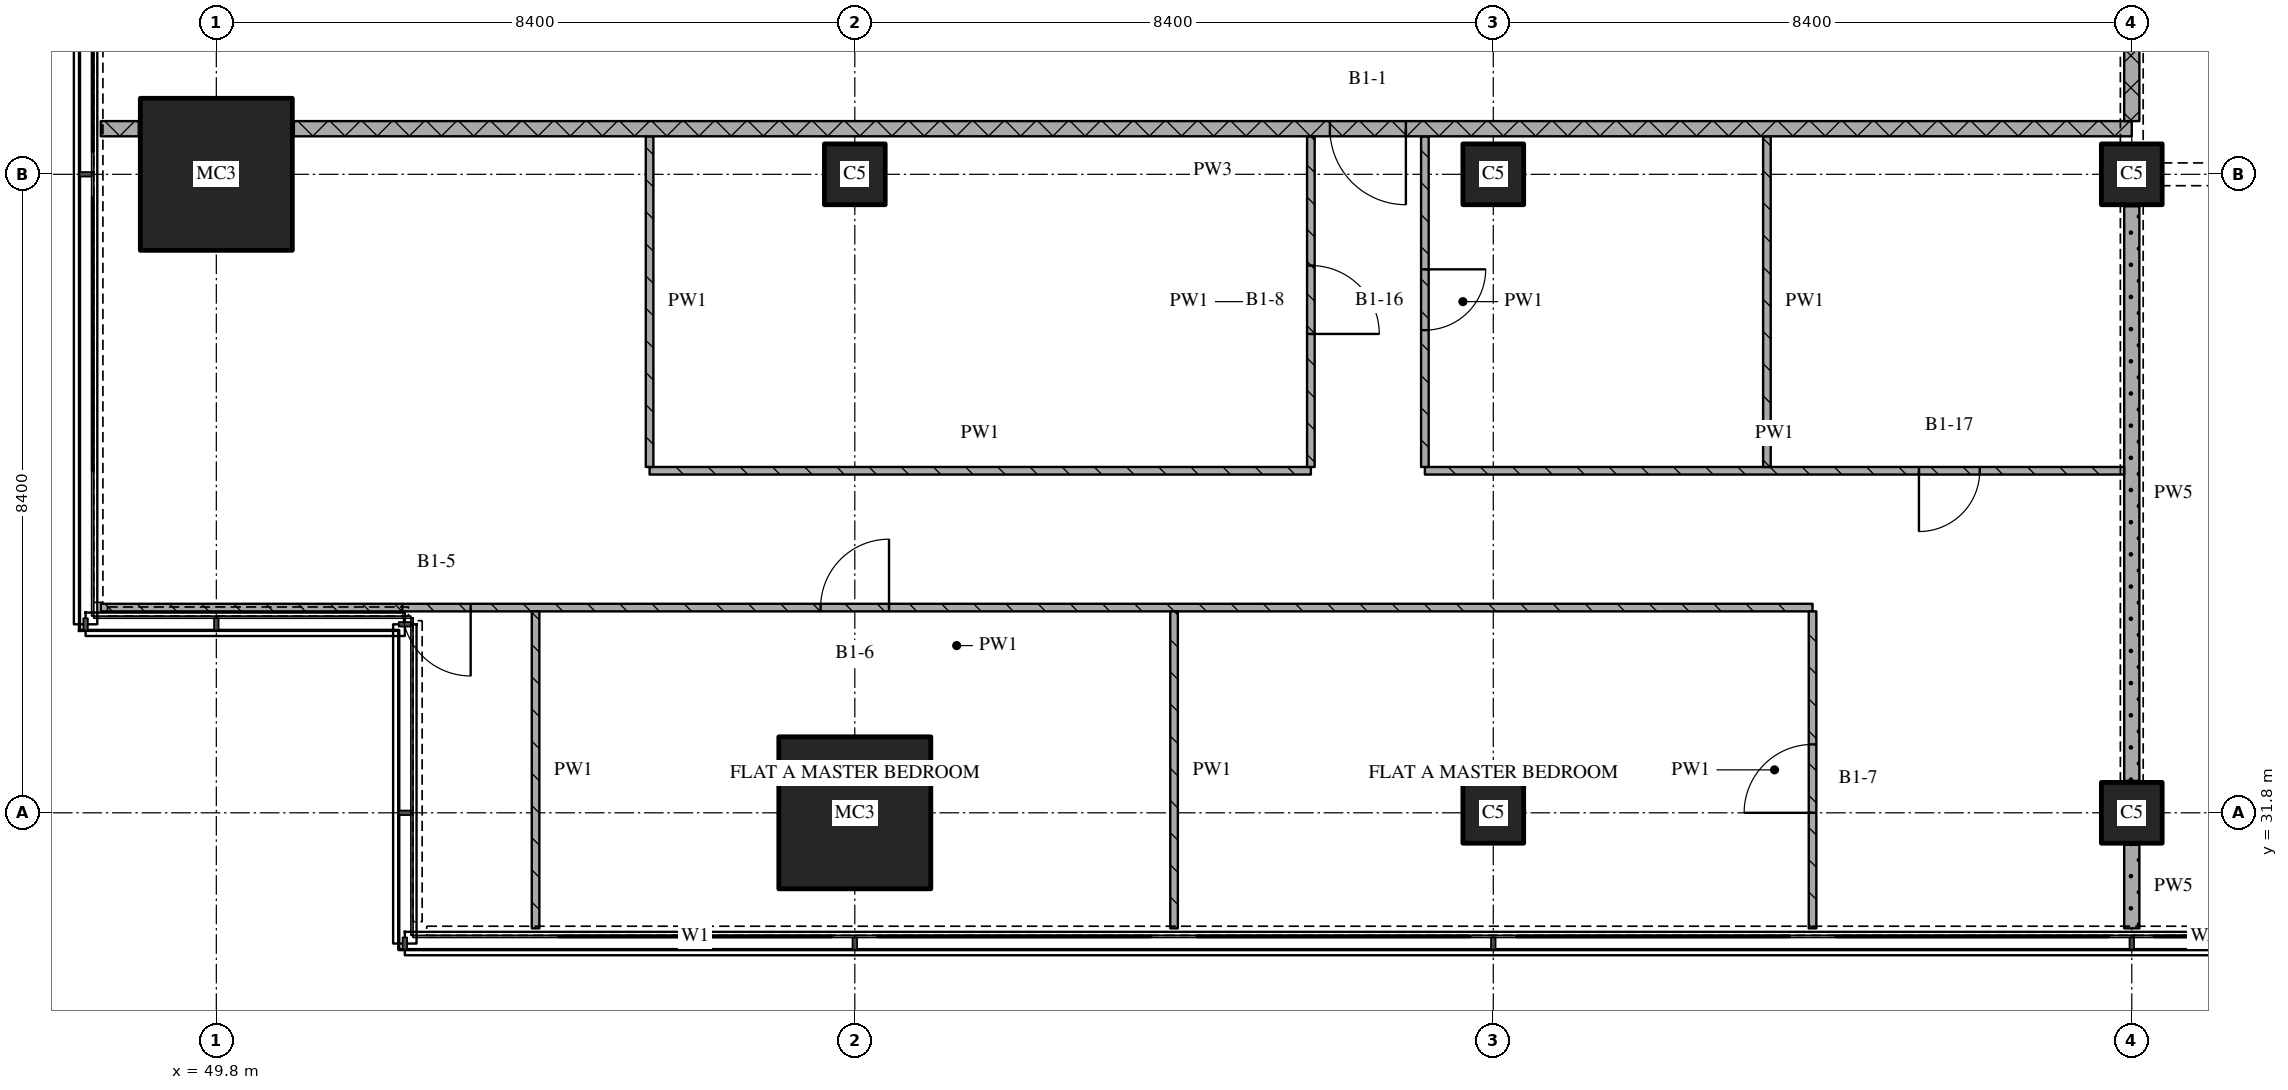
"""IFC4 building model, lengths in metres.
Left out: names, types, materials, properties, quantities, classifications, styles, units other than length and angle.
Written with IfcOpenShell. Run it as: python <this file> out.ifc"""

import sys

from ifc_helpers import new_model, si_unit, direction, frame, frame_2d, origin, origin_2d, place, context, subcontext, project, spatial, rectangle, extrude, element, fill, save


model = new_model("IFC4")
c1 = context("Model", 3, precision=1e-05, world=origin(), true_north=direction((0.0, 1.0)))
c2 = subcontext(c1, "Body", "Model", "MODEL_VIEW")
j1 = project(units=[si_unit("LENGTHUNIT", "METRE"), si_unit("PLANEANGLEUNIT", "RADIAN")], contexts=[c1])
p1 = place(None, origin())
s1 = spatial("IfcSite", under=j1, at=p1, CompositionType="ELEMENT")
p2 = place(p1, origin())
s2 = spatial("IfcBuilding", under=s1, at=p2, CompositionType="ELEMENT")
p3 = place(p2, frame((0.0, 0.0, 95.25)))
s3 = spatial("IfcBuildingStorey", under=s2, at=p3, CompositionType="ELEMENT", Elevation=95.25)
for number, where, z_axis, x_axis in (
    (1, (49.8, 40.2, 0.0), (0.0, 0.0, 1.0), (1.0, 0.0, 0.0)),
    (2, (58.2, 31.8, 0.0), (0.0, 0.0, 1.0), (1.0, 0.0, 0.0)),
):
    element("IfcColumn", number, at=place(p3, frame(where, z_axis=z_axis, x_axis=x_axis)), inside=s3, PredefinedType="COLUMN", context=c2, shape_type="SweptSolid", body=[
        extrude(rectangle(XDim=2.0, YDim=2.0, at=origin_2d()), origin(), (0.0, 0.0, 1.0), 3.6),
    ])
for number, where, z_axis, x_axis in (
    (3, (58.2, 40.2, 0.0), (0.0, 0.0, 1.0), (1.0, 0.0, 0.0)),
    (4, (66.6, 31.8, 0.0), (0.0, 0.0, 1.0), (1.0, 0.0, 0.0)),
    (5, (66.6, 40.2, 0.0), (0.0, 0.0, 1.0), (1.0, 0.0, 0.0)),
    (6, (75.0, 31.8, 0.0), (0.0, 0.0, 1.0), (1.0, 0.0, 0.0)),
    (7, (75.0, 40.2, 0.0), (0.0, 0.0, 1.0), (1.0, 0.0, 0.0)),
):
    element("IfcColumn", number, at=place(p3, frame(where, z_axis=z_axis, x_axis=x_axis)), inside=s3, PredefinedType="COLUMN", context=c2, shape_type="SweptSolid", body=[
        extrude(rectangle(XDim=0.8, YDim=0.8, at=origin_2d()), origin(), (0.0, 0.0, 1.0), 3.6),
    ])
p4 = place(p3, frame((70.8, 34.5, 0.0), z_axis=(0.0, 0.0, 1.0), x_axis=(-1.0, 0.0, 0.0)))
e8 = element("IfcWall", 8, at=p4, inside=s3, PredefinedType="PARTITIONING", context=c2, shape_type="SweptSolid", body=[
    extrude(rectangle(XDim=22.52, YDim=0.1, at=frame_2d((11.26, 0.0))), origin(), (0.0, 0.0, 1.0), 3.32),
])
p5 = place(p4, frame((12.15, 0.0, 0.0)))
e9 = element("IfcOpeningElement", 9, at=p5, cuts=e8, PredefinedType="OPENING", context=c2, shape_type="SweptSolid", body=[
    extrude(rectangle(XDim=0.9, YDim=2.1, at=frame_2d((0.45, 1.05))), frame((0.0, 0.06, 0.0), z_axis=(0.0, -1.0, 0.0), x_axis=(1.0, 0.0, 0.0)), (0.0, 0.0, 1.0), 0.12),
])
p6 = place(p4, frame((17.654, 0.0, 0.0)))
e10 = element("IfcOpeningElement", 10, at=p6, cuts=e8, PredefinedType="OPENING", context=c2, shape_type="SweptSolid", body=[
    extrude(rectangle(XDim=0.9, YDim=2.1, at=frame_2d((0.45, 1.05))), frame((0.0, 0.06, 0.0), z_axis=(0.0, -1.0, 0.0), x_axis=(1.0, 0.0, 0.0)), (0.0, 0.0, 1.0), 0.12),
])
p7 = place(p3, frame((55.5, 36.3, 0.0), z_axis=(0.0, 0.0, 1.0), x_axis=(1.0, 0.0, 0.0)))
e11 = element("IfcWall", 11, at=p7, inside=s3, PredefinedType="PARTITIONING", context=c2, shape_type="SweptSolid", body=[
    extrude(rectangle(XDim=8.7, YDim=0.1, at=frame_2d((4.35, 0.0))), origin(), (0.0, 0.0, 1.0), 3.32),
])
p8 = place(p3, frame((65.7, 36.3, 0.0), z_axis=(0.0, 0.0, 1.0), x_axis=(1.0, 0.0, 0.0)))
e12 = element("IfcWall", 12, at=p8, inside=s3, PredefinedType="PARTITIONING", context=c2, shape_type="SweptSolid", body=[
    extrude(rectangle(XDim=9.2, YDim=0.1, at=frame_2d((4.6, 0.0))), origin(), (0.0, 0.0, 1.0), 3.32),
])
p9 = place(p8, frame((6.5, 0.0, 0.0)))
e13 = element("IfcOpeningElement", 13, at=p9, cuts=e12, PredefinedType="OPENING", context=c2, shape_type="SweptSolid", body=[
    extrude(rectangle(XDim=0.8, YDim=2.1, at=frame_2d((0.4, 1.05))), frame((0.0, 0.06, 0.0), z_axis=(0.0, -1.0, 0.0), x_axis=(1.0, 0.0, 0.0)), (0.0, 0.0, 1.0), 0.12),
])
p10 = place(p3, frame((48.28, 40.8, 0.0), z_axis=(0.0, 0.0, 1.0), x_axis=(1.0, 0.0, 0.0)))
e14 = element("IfcWall", 14, at=p10, inside=s3, PredefinedType="PARTITIONING", context=c2, shape_type="SweptSolid", body=[
    extrude(rectangle(XDim=0.5, YDim=0.2, at=frame_2d((0.25, 0.0))), origin(), (0.0, 0.0, 1.0), 3.32),
])
p11 = place(p3, frame((75.0, 40.8, 0.0), z_axis=(0.0, 0.0, 1.0), x_axis=(-1.0, 0.0, 0.0)))
e15 = element("IfcWall", 15, at=p11, inside=s3, PredefinedType="PARTITIONING", context=c2, shape_type="SweptSolid", body=[
    extrude(rectangle(XDim=24.18, YDim=0.2, at=frame_2d((12.09, 0.0))), origin(), (0.0, 0.0, 1.0), 3.32),
])
p12 = place(p11, frame((9.55, 0.0, 0.0)))
e16 = element("IfcOpeningElement", 16, at=p12, cuts=e15, PredefinedType="OPENING", context=c2, shape_type="SweptSolid", body=[
    extrude(rectangle(XDim=1.0, YDim=2.1, at=frame_2d((0.5, 1.05))), frame((0.0, 0.11, 0.0), z_axis=(0.0, -1.0, 0.0), x_axis=(1.0, 0.0, 0.0)), (0.0, 0.0, 1.0), 0.22),
])
p13 = place(p3, frame((54.0, 34.45, 0.0), z_axis=(0.0, 0.0, 1.0), x_axis=(0.0, -1.0, 0.0)))
e17 = element("IfcWall", 17, at=p13, inside=s3, PredefinedType="PARTITIONING", context=c2, shape_type="SweptSolid", body=[
    extrude(rectangle(XDim=4.17, YDim=0.1, at=frame_2d((2.085, 0.0))), origin(), (0.0, 0.0, 1.0), 3.32),
])
p14 = place(p3, frame((55.5, 40.7, 0.0), z_axis=(0.0, 0.0, 1.0), x_axis=(0.0, -1.0, 0.0)))
e18 = element("IfcWall", 18, at=p14, inside=s3, PredefinedType="PARTITIONING", context=c2, shape_type="SweptSolid", body=[
    extrude(rectangle(XDim=4.35, YDim=0.1, at=frame_2d((2.175, 0.0))), origin(), (0.0, 0.0, 1.0), 3.32),
])
p15 = place(p3, frame((62.4, 34.45, 0.0), z_axis=(0.0, 0.0, 1.0), x_axis=(0.0, -1.0, 0.0)))
e19 = element("IfcWall", 19, at=p15, inside=s3, PredefinedType="PARTITIONING", context=c2, shape_type="SweptSolid", body=[
    extrude(rectangle(XDim=4.17, YDim=0.1, at=frame_2d((2.085, 0.0))), origin(), (0.0, 0.0, 1.0), 3.32),
])
p16 = place(p3, frame((64.2, 36.35, 0.0), z_axis=(0.0, 0.0, 1.0), x_axis=(0.0, 1.0, 0.0)))
e20 = element("IfcWall", 20, at=p16, inside=s3, PredefinedType="PARTITIONING", context=c2, shape_type="SweptSolid", body=[
    extrude(rectangle(XDim=4.35, YDim=0.1, at=frame_2d((2.175, 0.0))), origin(), (0.0, 0.0, 1.0), 3.32),
])
p17 = place(p16, frame((1.75, 0.0, 0.0)))
e21 = element("IfcOpeningElement", 21, at=p17, cuts=e20, PredefinedType="OPENING", context=c2, shape_type="SweptSolid", body=[
    extrude(rectangle(XDim=0.9, YDim=2.1, at=frame_2d((0.45, 1.05))), frame((0.0, 0.06, 0.0), z_axis=(0.0, -1.0, 0.0), x_axis=(1.0, 0.0, 0.0)), (0.0, 0.0, 1.0), 0.12),
])
p18 = place(p3, frame((65.7, 40.7, 0.0), z_axis=(0.0, 0.0, 1.0), x_axis=(0.0, -1.0, 0.0)))
e22 = element("IfcWall", 22, at=p18, inside=s3, PredefinedType="PARTITIONING", context=c2, shape_type="SweptSolid", body=[
    extrude(rectangle(XDim=4.35, YDim=0.1, at=frame_2d((2.175, 0.0))), origin(), (0.0, 0.0, 1.0), 3.32),
])
p19 = place(p18, frame((1.75, 0.0, 0.0)))
e23 = element("IfcOpeningElement", 23, at=p19, cuts=e22, PredefinedType="OPENING", context=c2, shape_type="SweptSolid", body=[
    extrude(rectangle(XDim=0.8, YDim=2.1, at=frame_2d((0.4, 1.05))), frame((0.0, 0.06, 0.0), z_axis=(0.0, -1.0, 0.0), x_axis=(1.0, 0.0, 0.0)), (0.0, 0.0, 1.0), 0.12),
])
p20 = place(p3, frame((70.2, 40.7, 0.0), z_axis=(0.0, 0.0, 1.0), x_axis=(0.0, -1.0, 0.0)))
e24 = element("IfcWall", 24, at=p20, inside=s3, PredefinedType="PARTITIONING", context=c2, shape_type="SweptSolid", body=[
    extrude(rectangle(XDim=4.35, YDim=0.1, at=frame_2d((2.175, 0.0))), origin(), (0.0, 0.0, 1.0), 3.32),
])
p21 = place(p3, frame((70.8, 30.28, 0.0), z_axis=(0.0, 0.0, 1.0), x_axis=(0.0, 1.0, 0.0)))
e25 = element("IfcWall", 25, at=p21, inside=s3, PredefinedType="PARTITIONING", context=c2, shape_type="SweptSolid", body=[
    extrude(rectangle(XDim=4.17, YDim=0.1, at=frame_2d((2.085, 0.0))), origin(), (0.0, 0.0, 1.0), 3.32),
])
p22 = place(p21, frame((1.52, 0.0, 0.0)))
e26 = element("IfcOpeningElement", 26, at=p22, cuts=e25, PredefinedType="OPENING", context=c2, shape_type="SweptSolid", body=[
    extrude(rectangle(XDim=0.9, YDim=2.1, at=frame_2d((0.45, 1.05))), frame((0.0, 0.06, 0.0), z_axis=(0.0, -1.0, 0.0), x_axis=(1.0, 0.0, 0.0)), (0.0, 0.0, 1.0), 0.12),
])
p23 = place(p3, frame((75.0, 43.1, 0.0), z_axis=(0.0, 0.0, 1.0), x_axis=(0.0, -1.0, 0.0)))
e27 = element("IfcWall", 27, at=p23, inside=s3, PredefinedType="PARTITIONING", context=c2, shape_type="SweptSolid", body=[
    extrude(rectangle(XDim=2.2, YDim=0.2, at=frame_2d((1.1, 0.0))), origin(), (0.0, 0.0, 1.0), 2.43),
])
p24 = place(p3, frame((75.0, 31.38, 0.0), z_axis=(0.0, 0.0, 1.0), x_axis=(0.0, -1.0, 0.0)))
e28 = element("IfcWall", 28, at=p24, inside=s3, PredefinedType="PARTITIONING", context=c2, shape_type="SweptSolid", body=[
    extrude(rectangle(XDim=1.1, YDim=0.2, at=frame_2d((0.55, 0.0))), origin(), (0.0, 0.0, 1.0), 3.32),
])
p25 = place(p3, frame((75.0, 39.78, 0.0), z_axis=(0.0, 0.0, 1.0), x_axis=(0.0, -1.0, 0.0)))
e29 = element("IfcWall", 29, at=p25, inside=s3, PredefinedType="PARTITIONING", context=c2, shape_type="SweptSolid", body=[
    extrude(rectangle(XDim=7.56, YDim=0.2, at=frame_2d((3.78, 0.0))), origin(), (0.0, 0.0, 1.0), 2.83),
])
p26 = place(p5, origin())
e30 = element("IfcDoor", 30, at=p26, inside=s3, OperationType="SINGLE_SWING_RIGHT", PredefinedType="DOOR", context=c2, shape_type="SweptSolid", body=[
    extrude(rectangle(XDim=0.9, YDim=2.1, at=frame_2d((0.45, 1.05))), frame((0.0, 0.025, 0.0), z_axis=(0.0, -1.0, 0.0), x_axis=(1.0, 0.0, 0.0)), (0.0, 0.0, 1.0), 0.05),
])
fill(e9, e30)
p27 = place(p6, origin())
e31 = element("IfcDoor", 31, at=p27, inside=s3, OperationType="SINGLE_SWING_LEFT", PredefinedType="DOOR", context=c2, shape_type="SweptSolid", body=[
    extrude(rectangle(XDim=0.9, YDim=2.1, at=frame_2d((0.45, 1.05))), frame((0.0, 0.025, 0.0), z_axis=(0.0, -1.0, 0.0), x_axis=(1.0, 0.0, 0.0)), (0.0, 0.0, 1.0), 0.05),
])
fill(e10, e31)
p28 = place(p9, origin())
e32 = element("IfcDoor", 32, at=p28, inside=s3, OperationType="SINGLE_SWING_RIGHT", PredefinedType="DOOR", context=c2, shape_type="SweptSolid", body=[
    extrude(rectangle(XDim=0.8, YDim=2.1, at=frame_2d((0.4, 1.05))), frame((0.0, 0.025, 0.0), z_axis=(0.0, -1.0, 0.0), x_axis=(1.0, 0.0, 0.0)), (0.0, 0.0, 1.0), 0.05),
])
fill(e13, e32)
p29 = place(p12, origin())
e33 = element("IfcDoor", 33, at=p29, inside=s3, OperationType="SINGLE_SWING_LEFT", PredefinedType="DOOR", context=c2, shape_type="SweptSolid", body=[
    extrude(rectangle(XDim=1.0, YDim=2.1, at=frame_2d((0.5, 1.05))), frame((0.0, 0.025, 0.0), z_axis=(0.0, -1.0, 0.0), x_axis=(1.0, 0.0, 0.0)), (0.0, 0.0, 1.0), 0.05),
])
fill(e16, e33)
p30 = place(p17, origin())
e34 = element("IfcDoor", 34, at=p30, inside=s3, OperationType="SINGLE_SWING_RIGHT", PredefinedType="DOOR", context=c2, shape_type="SweptSolid", body=[
    extrude(rectangle(XDim=0.9, YDim=2.1, at=frame_2d((0.45, 1.05))), frame((0.0, 0.025, 0.0), z_axis=(0.0, -1.0, 0.0), x_axis=(1.0, 0.0, 0.0)), (0.0, 0.0, 1.0), 0.05),
])
fill(e21, e34)
p31 = place(p19, origin())
e35 = element("IfcDoor", 35, at=p31, inside=s3, OperationType="SINGLE_SWING_LEFT", PredefinedType="DOOR", context=c2, shape_type="SweptSolid", body=[
    extrude(rectangle(XDim=0.8, YDim=2.1, at=frame_2d((0.4, 1.05))), frame((0.0, 0.025, 0.0), z_axis=(0.0, -1.0, 0.0), x_axis=(1.0, 0.0, 0.0)), (0.0, 0.0, 1.0), 0.05),
])
fill(e23, e35)
p32 = place(p22, origin())
e36 = element("IfcDoor", 36, at=p32, inside=s3, OperationType="SINGLE_SWING_LEFT", PredefinedType="DOOR", context=c2, shape_type="SweptSolid", body=[
    extrude(rectangle(XDim=0.9, YDim=2.1, at=frame_2d((0.45, 1.05))), frame((0.0, 0.025, 0.0), z_axis=(0.0, -1.0, 0.0), x_axis=(1.0, 0.0, 0.0)), (0.0, 0.0, 1.0), 0.05),
])
fill(e26, e36)
save(model, sys.argv[1])
